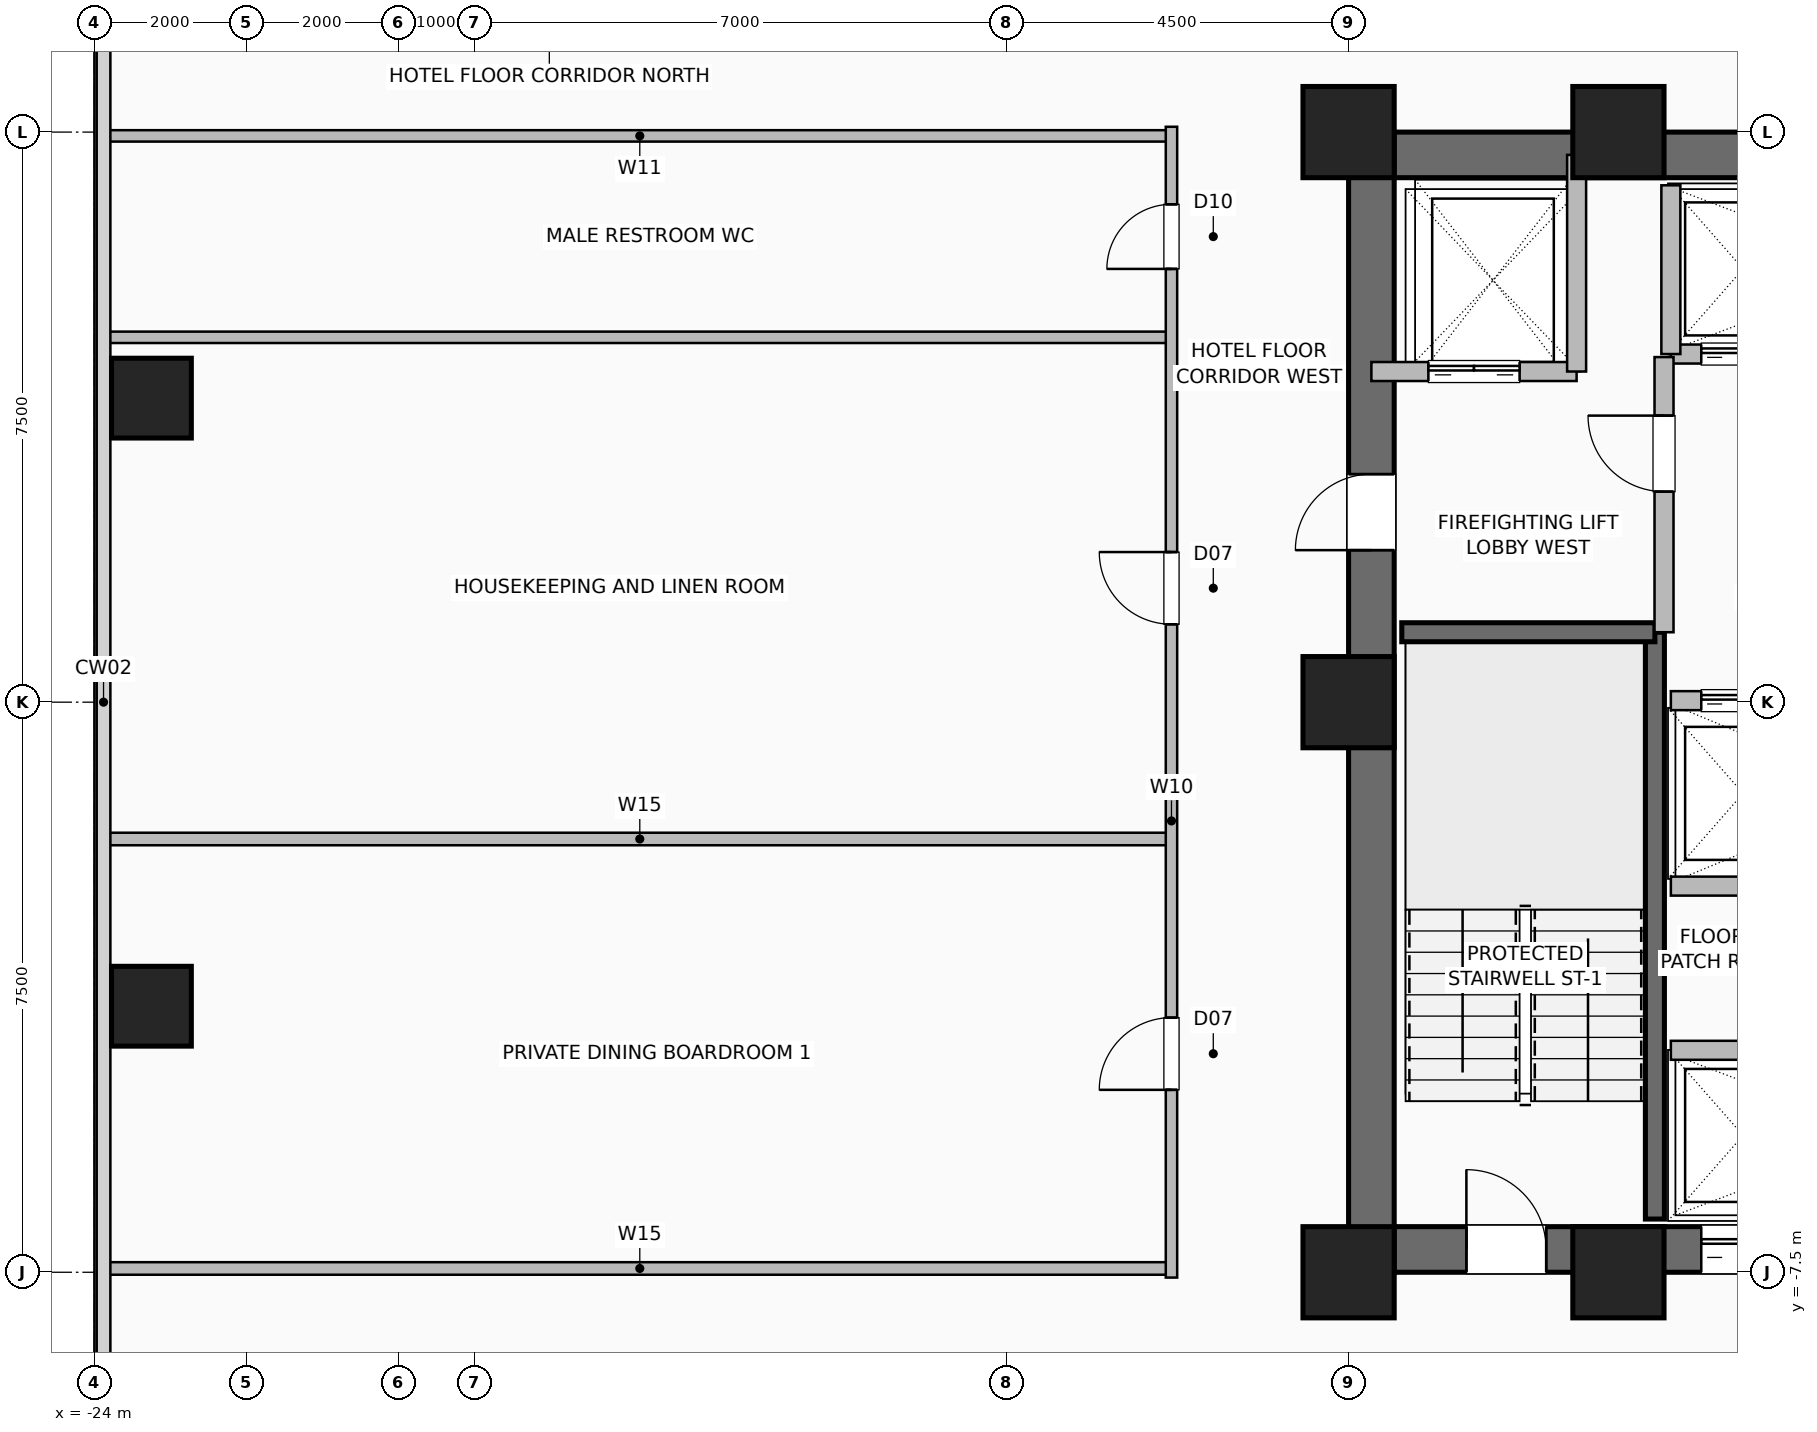
"""IFC4 building model, lengths in metres.
Left out: names, types, materials, properties, quantities, classifications, styles, units other than length and angle.
Written with IfcOpenShell. Run it as: python <this file> out.ifc"""

import sys

from ifc_helpers import new_model, si_unit, direction, frame, frame_2d, origin, origin_2d, place, context, subcontext, project, spatial, rectangle, hollow_rectangle, extrude, element, fill, save


model = new_model("IFC4")
c1 = context("Model", 3, precision=1e-05, world=origin(), true_north=direction((0.0, 1.0)))
c2 = subcontext(c1, "Body", "Model", "MODEL_VIEW")
j1 = project(units=[si_unit("LENGTHUNIT", "METRE"), si_unit("PLANEANGLEUNIT", "RADIAN")], contexts=[c1])
p1 = place(None, origin())
s1 = spatial("IfcSite", under=j1, at=p1, CompositionType="ELEMENT")
p2 = place(p1, origin())
s2 = spatial("IfcBuilding", under=s1, at=p2, CompositionType="ELEMENT")
p3 = place(p2, frame((0.0, 0.0, 72.5)))
s3 = spatial("IfcBuildingStorey", under=s2, at=p3, CompositionType="ELEMENT", Elevation=72.5)
for number, where, z_axis, x_axis in (
    (1, (-7.5, -7.5, 0.0), (0.0, 0.0, 1.0), (1.0, 0.0, 0.0)),
    (2, (-3.95, -7.5, 0.0), (0.0, 0.0, 1.0), (1.0, 0.0, 0.0)),
    (3, (-3.95, 7.5, 0.0), (0.0, 0.0, 1.0), (1.0, 0.0, 0.0)),
    (4, (-7.5, 7.5, 0.0), (0.0, 0.0, 1.0), (1.0, 0.0, 0.0)),
    (5, (-7.5, 0.0, 0.0), (0.0, 0.0, 1.0), (1.0, 0.0, 0.0)),
):
    element("IfcColumn", number, at=place(p3, frame(where, z_axis=z_axis, x_axis=x_axis)), inside=s3, PredefinedType="COLUMN", context=c2, shape_type="SweptSolid", body=[
        extrude(hollow_rectangle(XDim=1.2, YDim=1.2, WallThickness=0.055, at=origin_2d()), origin(), (0.0, 0.0, 1.0), 3.5),
    ])
for number, where, z_axis, x_axis in (
    (6, (-23.25, -4.0, 0.0), (0.0, 0.0, 1.0), (1.0, 0.0, 0.0)),
    (7, (-23.25, 4.0, 0.0), (0.0, 0.0, 1.0), (1.0, 0.0, 0.0)),
):
    element("IfcColumn", number, at=place(p3, frame(where, z_axis=z_axis, x_axis=x_axis)), inside=s3, PredefinedType="COLUMN", context=c2, shape_type="SweptSolid", body=[
        extrude(hollow_rectangle(XDim=1.05, YDim=1.05, WallThickness=0.05, at=origin_2d()), origin(), (0.0, 0.0, 1.0), 3.5),
    ])
p4 = place(p3, frame((-7.5, -7.2, 0.0), z_axis=(0.0, 0.0, 1.0), x_axis=(1.0, 0.0, 0.0)))
e8 = element("IfcWall", 8, at=p4, inside=s3, PredefinedType="SHEAR", context=c2, shape_type="SweptSolid", body=[
    extrude(rectangle(XDim=15.0, YDim=0.6, at=frame_2d((7.5, 0.0))), origin(), (0.0, 0.0, 1.0), 3.25),
])
p5 = place(p4, frame((1.55, 0.0, 0.0)))
e9 = element("IfcOpeningElement", 9, at=p5, cuts=e8, PredefinedType="OPENING", context=c2, shape_type="SweptSolid", body=[
    extrude(rectangle(XDim=1.05, YDim=2.08, at=frame_2d((0.525, 1.04))), frame((0.0, 0.31, 0.0), z_axis=(0.0, -1.0, 0.0), x_axis=(1.0, 0.0, 0.0)), (0.0, 0.0, 1.0), 0.62),
])
p6 = place(p4, frame((12.4, 0.0, 0.0)))
e10 = element("IfcOpeningElement", 10, at=p6, cuts=e8, PredefinedType="OPENING", context=c2, shape_type="SweptSolid", body=[
    extrude(rectangle(XDim=1.05, YDim=2.08, at=frame_2d((0.525, 1.04))), frame((0.0, 0.31, 0.0), z_axis=(0.0, -1.0, 0.0), x_axis=(1.0, 0.0, 0.0)), (0.0, 0.0, 1.0), 0.62),
])
p7 = place(p4, frame((4.64, 0.0, 0.0)))
e11 = element("IfcOpeningElement", 11, at=p7, cuts=e8, PredefinedType="OPENING", context=c2, shape_type="SweptSolid", body=[
    extrude(rectangle(XDim=1.1, YDim=2.2, at=frame_2d((0.55, 1.1))), frame((0.0, 0.31, 0.0), z_axis=(0.0, -1.0, 0.0), x_axis=(1.0, 0.0, 0.0)), (0.0, 0.0, 1.0), 0.62),
])
p8 = place(p4, frame((6.52, 0.0, 0.0)))
e12 = element("IfcOpeningElement", 12, at=p8, cuts=e8, PredefinedType="OPENING", context=c2, shape_type="SweptSolid", body=[
    extrude(rectangle(XDim=1.1, YDim=2.2, at=frame_2d((0.55, 1.1))), frame((0.0, 0.31, 0.0), z_axis=(0.0, -1.0, 0.0), x_axis=(1.0, 0.0, 0.0)), (0.0, 0.0, 1.0), 0.62),
])
p9 = place(p4, frame((8.4, 0.0, 0.0)))
e13 = element("IfcOpeningElement", 13, at=p9, cuts=e8, PredefinedType="OPENING", context=c2, shape_type="SweptSolid", body=[
    extrude(rectangle(XDim=1.1, YDim=2.2, at=frame_2d((0.55, 1.1))), frame((0.0, 0.31, 0.0), z_axis=(0.0, -1.0, 0.0), x_axis=(1.0, 0.0, 0.0)), (0.0, 0.0, 1.0), 0.62),
])
p10 = place(p3, frame((-7.5, 7.2, 0.0), z_axis=(0.0, 0.0, 1.0), x_axis=(1.0, 0.0, 0.0)))
e14 = element("IfcWall", 14, at=p10, inside=s3, PredefinedType="SHEAR", context=c2, shape_type="SweptSolid", body=[
    extrude(rectangle(XDim=15.0, YDim=0.6, at=frame_2d((7.5, 0.0))), origin(), (0.0, 0.0, 1.0), 3.25),
])
p11 = place(p3, frame((-7.2, -7.5, 0.0), z_axis=(0.0, 0.0, 1.0), x_axis=(0.0, 1.0, 0.0)))
e15 = element("IfcWall", 15, at=p11, inside=s3, PredefinedType="SHEAR", context=c2, shape_type="SweptSolid", body=[
    extrude(rectangle(XDim=15.0, YDim=0.6, at=frame_2d((7.5, 0.0))), origin(), (0.0, 0.0, 1.0), 3.25),
])
p12 = place(p11, frame((9.5, 0.0, 0.0)))
e16 = element("IfcOpeningElement", 16, at=p12, cuts=e15, PredefinedType="OPENING", context=c2, shape_type="SweptSolid", body=[
    extrude(rectangle(XDim=1.0, YDim=2.08, at=frame_2d((0.5, 1.04))), frame((0.0, 0.31, 0.0), z_axis=(0.0, -1.0, 0.0), x_axis=(1.0, 0.0, 0.0)), (0.0, 0.0, 1.0), 0.62),
])
p13 = place(p3, frame((-3.47, -6.8, 0.0), z_axis=(0.0, 0.0, 1.0), x_axis=(0.0, 1.0, 0.0)))
e17 = element("IfcWall", 17, at=p13, inside=s3, PredefinedType="SHEAR", context=c2, shape_type="SweptSolid", body=[
    extrude(rectangle(XDim=7.72, YDim=0.25, at=frame_2d((3.86, 0.0))), origin(), (0.0, 0.0, 1.0), 3.25),
])
p14 = place(p3, frame((-6.8, 0.92, 0.0), z_axis=(0.0, 0.0, 1.0), x_axis=(1.0, 0.0, 0.0)))
e18 = element("IfcWall", 18, at=p14, inside=s3, PredefinedType="SHEAR", context=c2, shape_type="SweptSolid", body=[
    extrude(rectangle(XDim=3.33, YDim=0.25, at=frame_2d((1.665, 0.0))), origin(), (0.0, 0.0, 1.0), 3.25),
])
p15 = place(p3, frame((-3.26, -4.58, 0.0), z_axis=(0.0, 0.0, 1.0), x_axis=(1.0, 0.0, 0.0)))
e19 = element("IfcWall", 19, at=p15, inside=s3, PredefinedType="SHEAR", context=c2, shape_type="SweptSolid", body=[
    extrude(rectangle(XDim=5.64, YDim=0.25, at=frame_2d((2.82, 0.0))), origin(), (0.0, 0.0, 1.0), 3.25),
])
p16 = place(p3, frame((-3.26, 0.02, 0.0), z_axis=(0.0, 0.0, 1.0), x_axis=(1.0, 0.0, 0.0)))
e20 = element("IfcWall", 20, at=p16, inside=s3, PredefinedType="SHEAR", context=c2, shape_type="SweptSolid", body=[
    extrude(rectangle(XDim=5.64, YDim=0.25, at=frame_2d((2.82, 0.0))), origin(), (0.0, 0.0, 1.0), 3.25),
])
p17 = place(p16, frame((0.4, 0.0, 0.0)))
e21 = element("IfcOpeningElement", 21, at=p17, cuts=e20, PredefinedType="OPENING", context=c2, shape_type="SweptSolid", body=[
    extrude(rectangle(XDim=1.1, YDim=2.2, at=frame_2d((0.55, 1.1))), frame((0.0, 0.135, 0.0), z_axis=(0.0, -1.0, 0.0), x_axis=(1.0, 0.0, 0.0)), (0.0, 0.0, 1.0), 0.27),
])
p18 = place(p16, frame((2.28, 0.0, 0.0)))
e22 = element("IfcOpeningElement", 22, at=p18, cuts=e20, PredefinedType="OPENING", context=c2, shape_type="SweptSolid", body=[
    extrude(rectangle(XDim=1.1, YDim=2.2, at=frame_2d((0.55, 1.1))), frame((0.0, 0.135, 0.0), z_axis=(0.0, -1.0, 0.0), x_axis=(1.0, 0.0, 0.0)), (0.0, 0.0, 1.0), 0.27),
])
p19 = place(p16, frame((4.16, 0.0, 0.0)))
e23 = element("IfcOpeningElement", 23, at=p19, cuts=e20, PredefinedType="OPENING", context=c2, shape_type="SweptSolid", body=[
    extrude(rectangle(XDim=1.1, YDim=2.2, at=frame_2d((0.55, 1.1))), frame((0.0, 0.135, 0.0), z_axis=(0.0, -1.0, 0.0), x_axis=(1.0, 0.0, 0.0)), (0.0, 0.0, 1.0), 0.27),
])
p20 = place(p3, frame((-3.26, -2.42, 0.0), z_axis=(0.0, 0.0, 1.0), x_axis=(1.0, 0.0, 0.0)))
e24 = element("IfcWall", 24, at=p20, inside=s3, PredefinedType="SHEAR", context=c2, shape_type="SweptSolid", body=[
    extrude(rectangle(XDim=5.64, YDim=0.25, at=frame_2d((2.82, 0.0))), origin(), (0.0, 0.0, 1.0), 3.25),
])
p21 = place(p3, frame((-3.26, 4.58, 0.0), z_axis=(0.0, 0.0, 1.0), x_axis=(1.0, 0.0, 0.0)))
e25 = element("IfcWall", 25, at=p21, inside=s3, PredefinedType="SHEAR", context=c2, shape_type="SweptSolid", body=[
    extrude(rectangle(XDim=5.64, YDim=0.25, at=frame_2d((2.82, 0.0))), origin(), (0.0, 0.0, 1.0), 3.25),
])
p22 = place(p21, frame((0.4, 0.0, 0.0)))
e26 = element("IfcOpeningElement", 26, at=p22, cuts=e25, PredefinedType="OPENING", context=c2, shape_type="SweptSolid", body=[
    extrude(rectangle(XDim=1.1, YDim=2.2, at=frame_2d((0.55, 1.1))), frame((0.0, 0.135, 0.0), z_axis=(0.0, -1.0, 0.0), x_axis=(1.0, 0.0, 0.0)), (0.0, 0.0, 1.0), 0.27),
])
p23 = place(p21, frame((2.28, 0.0, 0.0)))
e27 = element("IfcOpeningElement", 27, at=p23, cuts=e25, PredefinedType="OPENING", context=c2, shape_type="SweptSolid", body=[
    extrude(rectangle(XDim=1.1, YDim=2.2, at=frame_2d((0.55, 1.1))), frame((0.0, 0.135, 0.0), z_axis=(0.0, -1.0, 0.0), x_axis=(1.0, 0.0, 0.0)), (0.0, 0.0, 1.0), 0.27),
])
p24 = place(p21, frame((4.16, 0.0, 0.0)))
e28 = element("IfcOpeningElement", 28, at=p24, cuts=e25, PredefinedType="OPENING", context=c2, shape_type="SweptSolid", body=[
    extrude(rectangle(XDim=1.1, YDim=2.2, at=frame_2d((0.55, 1.1))), frame((0.0, 0.135, 0.0), z_axis=(0.0, -1.0, 0.0), x_axis=(1.0, 0.0, 0.0)), (0.0, 0.0, 1.0), 0.27),
])
p25 = place(p3, frame((-3.26, 4.58, 0.0), z_axis=(0.0, 0.0, 1.0), x_axis=(0.0, 1.0, 0.0)))
e29 = element("IfcWall", 29, at=p25, inside=s3, PredefinedType="SHEAR", context=c2, shape_type="SweptSolid", body=[
    extrude(rectangle(XDim=2.22, YDim=0.25, at=frame_2d((1.11, 0.0))), origin(), (0.0, 0.0, 1.0), 3.25),
])
p26 = place(p3, frame((-7.2, 4.35, 0.0), z_axis=(0.0, 0.0, 1.0), x_axis=(1.0, 0.0, 0.0)))
e30 = element("IfcWall", 30, at=p26, inside=s3, PredefinedType="SHEAR", context=c2, shape_type="SweptSolid", body=[
    extrude(rectangle(XDim=2.7, YDim=0.25, at=frame_2d((1.35, 0.0))), origin(), (0.0, 0.0, 1.0), 3.25),
])
p27 = place(p26, frame((0.75, 0.0, 0.0)))
e31 = element("IfcOpeningElement", 31, at=p27, cuts=e30, PredefinedType="OPENING", context=c2, shape_type="SweptSolid", body=[
    extrude(rectangle(XDim=1.2, YDim=2.2, at=frame_2d((0.6, 1.1))), frame((0.0, 0.135, 0.0), z_axis=(0.0, -1.0, 0.0), x_axis=(1.0, 0.0, 0.0)), (0.0, 0.0, 1.0), 0.27),
])
p28 = place(p3, frame((-4.5, 4.35, 0.0), z_axis=(0.0, 0.0, 1.0), x_axis=(0.0, 1.0, 0.0)))
e32 = element("IfcWall", 32, at=p28, inside=s3, PredefinedType="SHEAR", context=c2, shape_type="SweptSolid", body=[
    extrude(rectangle(XDim=2.85, YDim=0.25, at=frame_2d((1.425, 0.0))), origin(), (0.0, 0.0, 1.0), 3.25),
])
p29 = place(p3, frame((-3.35, 0.92, 0.0), z_axis=(0.0, 0.0, 1.0), x_axis=(0.0, 1.0, 0.0)))
e33 = element("IfcWall", 33, at=p29, inside=s3, PredefinedType="SHEAR", context=c2, shape_type="SweptSolid", body=[
    extrude(rectangle(XDim=3.62, YDim=0.25, at=frame_2d((1.81, 0.0))), origin(), (0.0, 0.0, 1.0), 3.25),
])
p30 = place(p29, frame((1.85, 0.0, 0.0)))
e34 = element("IfcOpeningElement", 34, at=p30, cuts=e33, PredefinedType="OPENING", context=c2, shape_type="SweptSolid", body=[
    extrude(rectangle(XDim=1.0, YDim=2.08, at=frame_2d((0.5, 1.04))), frame((0.0, 0.135, 0.0), z_axis=(0.0, -1.0, 0.0), x_axis=(1.0, 0.0, 0.0)), (0.0, 0.0, 1.0), 0.27),
])
for number, where, z_axis, x_axis in (
    (35, (-23.82, -7.45, 0.0), (0.0, 0.0, 1.0), (1.0, 0.0, 0.0)),
    (36, (-23.82, -1.8, 0.0), (0.0, 0.0, 1.0), (1.0, 0.0, 0.0)),
):
    element("IfcWall", number, at=place(p3, frame(where, z_axis=z_axis, x_axis=x_axis)), inside=s3, PredefinedType="PLUMBINGWALL", context=c2, shape_type="SweptSolid", body=[
        extrude(rectangle(XDim=13.99, YDim=0.165, at=frame_2d((6.995, 0.0))), origin(), (0.0, 0.0, 1.0), 3.25),
    ])
for number, where, z_axis, x_axis in (
    (37, (-23.82, 4.8, 0.0), (0.0, 0.0, 1.0), (1.0, 0.0, 0.0)),
    (38, (-23.82, 7.45, 0.0), (0.0, 0.0, 1.0), (1.0, 0.0, 0.0)),
):
    element("IfcWall", number, at=place(p3, frame(where, z_axis=z_axis, x_axis=x_axis)), inside=s3, PredefinedType="PARTITIONING", context=c2, shape_type="SweptSolid", body=[
        extrude(rectangle(XDim=13.99, YDim=0.15, at=frame_2d((6.995, 0.0))), origin(), (0.0, 0.0, 1.0), 3.25),
    ])
p31 = place(p3, frame((-9.83, -7.57, 0.0), z_axis=(0.0, 0.0, 1.0), x_axis=(0.0, 1.0, 0.0)))
e39 = element("IfcWall", 39, at=p31, inside=s3, PredefinedType="PARTITIONING", context=c2, shape_type="SweptSolid", body=[
    extrude(rectangle(XDim=15.14, YDim=0.15, at=frame_2d((7.57, 0.0))), origin(), (0.0, 0.0, 1.0), 3.25),
])
p32 = place(p31, frame((2.47, 0.0, 0.0)))
e40 = element("IfcOpeningElement", 40, at=p32, cuts=e39, PredefinedType="OPENING", context=c2, shape_type="SweptSolid", body=[
    extrude(rectangle(XDim=0.95, YDim=2.06, at=frame_2d((0.475, 1.03))), frame((0.0, 0.085, 0.0), z_axis=(0.0, -1.0, 0.0), x_axis=(1.0, 0.0, 0.0)), (0.0, 0.0, 1.0), 0.17),
])
p33 = place(p31, frame((8.595, 0.0, 0.0)))
e41 = element("IfcOpeningElement", 41, at=p33, cuts=e39, PredefinedType="OPENING", context=c2, shape_type="SweptSolid", body=[
    extrude(rectangle(XDim=0.95, YDim=2.06, at=frame_2d((0.475, 1.03))), frame((0.0, 0.085, 0.0), z_axis=(0.0, -1.0, 0.0), x_axis=(1.0, 0.0, 0.0)), (0.0, 0.0, 1.0), 0.17),
])
p34 = place(p31, frame((13.27, 0.0, 0.0)))
e42 = element("IfcOpeningElement", 42, at=p34, cuts=e39, PredefinedType="OPENING", context=c2, shape_type="SweptSolid", body=[
    extrude(rectangle(XDim=0.85, YDim=2.05, at=frame_2d((0.425, 1.025))), frame((0.0, 0.085, 0.0), z_axis=(0.0, -1.0, 0.0), x_axis=(1.0, 0.0, 0.0)), (0.0, 0.0, 1.0), 0.17),
])
p35 = place(p5, origin())
e43 = element("IfcDoor", 43, at=p35, inside=s3, OperationType="SINGLE_SWING_LEFT", PredefinedType="DOOR", context=c2, shape_type="SweptSolid", body=[
    extrude(rectangle(XDim=1.05, YDim=2.08, at=frame_2d((0.525, 1.04))), frame((0.0, 0.025, 0.0), z_axis=(0.0, -1.0, 0.0), x_axis=(1.0, 0.0, 0.0)), (0.0, 0.0, 1.0), 0.05),
])
fill(e9, e43)
p36 = place(p12, origin())
e44 = element("IfcDoor", 44, at=p36, inside=s3, OperationType="SINGLE_SWING_LEFT", PredefinedType="DOOR", context=c2, shape_type="SweptSolid", body=[
    extrude(rectangle(XDim=1.0, YDim=2.08, at=frame_2d((0.5, 1.04))), frame((0.0, 0.025, 0.0), z_axis=(0.0, -1.0, 0.0), x_axis=(1.0, 0.0, 0.0)), (0.0, 0.0, 1.0), 0.05),
])
fill(e16, e44)
p37 = place(p7, origin())
e45 = element("IfcDoor", 45, at=p37, inside=s3, OperationType="DOUBLE_DOOR_SLIDING", PredefinedType="DOOR", context=c2, shape_type="SweptSolid", body=[
    extrude(rectangle(XDim=1.1, YDim=2.2, at=frame_2d((0.55, 1.1))), frame((0.0, 0.025, 0.0), z_axis=(0.0, -1.0, 0.0), x_axis=(1.0, 0.0, 0.0)), (0.0, 0.0, 1.0), 0.05),
])
fill(e11, e45)
p38 = place(p17, origin())
e46 = element("IfcDoor", 46, at=p38, inside=s3, OperationType="DOUBLE_DOOR_SLIDING", PredefinedType="DOOR", context=c2, shape_type="SweptSolid", body=[
    extrude(rectangle(XDim=1.1, YDim=2.2, at=frame_2d((0.55, 1.1))), frame((0.0, 0.025, 0.0), z_axis=(0.0, -1.0, 0.0), x_axis=(1.0, 0.0, 0.0)), (0.0, 0.0, 1.0), 0.05),
])
fill(e21, e46)
p39 = place(p22, origin())
e47 = element("IfcDoor", 47, at=p39, inside=s3, OperationType="DOUBLE_DOOR_SLIDING", PredefinedType="DOOR", context=c2, shape_type="SweptSolid", body=[
    extrude(rectangle(XDim=1.1, YDim=2.2, at=frame_2d((0.55, 1.1))), frame((0.0, 0.025, 0.0), z_axis=(0.0, -1.0, 0.0), x_axis=(1.0, 0.0, 0.0)), (0.0, 0.0, 1.0), 0.05),
])
fill(e26, e47)
p40 = place(p27, origin())
e48 = element("IfcDoor", 48, at=p40, inside=s3, OperationType="DOUBLE_DOOR_SLIDING", PredefinedType="DOOR", context=c2, shape_type="SweptSolid", body=[
    extrude(rectangle(XDim=1.2, YDim=2.2, at=frame_2d((0.6, 1.1))), frame((0.0, 0.025, 0.0), z_axis=(0.0, -1.0, 0.0), x_axis=(1.0, 0.0, 0.0)), (0.0, 0.0, 1.0), 0.05),
])
fill(e31, e48)
p41 = place(p30, origin())
e49 = element("IfcDoor", 49, at=p41, inside=s3, OperationType="SINGLE_SWING_RIGHT", PredefinedType="DOOR", context=c2, shape_type="SweptSolid", body=[
    extrude(rectangle(XDim=1.0, YDim=2.08, at=frame_2d((0.5, 1.04))), frame((0.0, 0.025, 0.0), z_axis=(0.0, -1.0, 0.0), x_axis=(1.0, 0.0, 0.0)), (0.0, 0.0, 1.0), 0.05),
])
fill(e34, e49)
p42 = place(p32, origin())
e50 = element("IfcDoor", 50, at=p42, inside=s3, OperationType="SINGLE_SWING_LEFT", PredefinedType="DOOR", context=c2, shape_type="SweptSolid", body=[
    extrude(rectangle(XDim=0.95, YDim=2.06, at=frame_2d((0.475, 1.03))), frame((0.0, 0.025, 0.0), z_axis=(0.0, -1.0, 0.0), x_axis=(1.0, 0.0, 0.0)), (0.0, 0.0, 1.0), 0.05),
])
fill(e40, e50)
p43 = place(p33, origin())
e51 = element("IfcDoor", 51, at=p43, inside=s3, OperationType="SINGLE_SWING_RIGHT", PredefinedType="DOOR", context=c2, shape_type="SweptSolid", body=[
    extrude(rectangle(XDim=0.95, YDim=2.06, at=frame_2d((0.475, 1.03))), frame((0.0, 0.025, 0.0), z_axis=(0.0, -1.0, 0.0), x_axis=(1.0, 0.0, 0.0)), (0.0, 0.0, 1.0), 0.05),
])
fill(e41, e51)
p44 = place(p34, origin())
e52 = element("IfcDoor", 52, at=p44, inside=s3, OperationType="SINGLE_SWING_LEFT", PredefinedType="DOOR", context=c2, shape_type="SweptSolid", body=[
    extrude(rectangle(XDim=0.85, YDim=2.05, at=frame_2d((0.425, 1.025))), frame((0.0, 0.025, 0.0), z_axis=(0.0, -1.0, 0.0), x_axis=(1.0, 0.0, 0.0)), (0.0, 0.0, 1.0), 0.05),
])
fill(e42, e52)
save(model, sys.argv[1])
